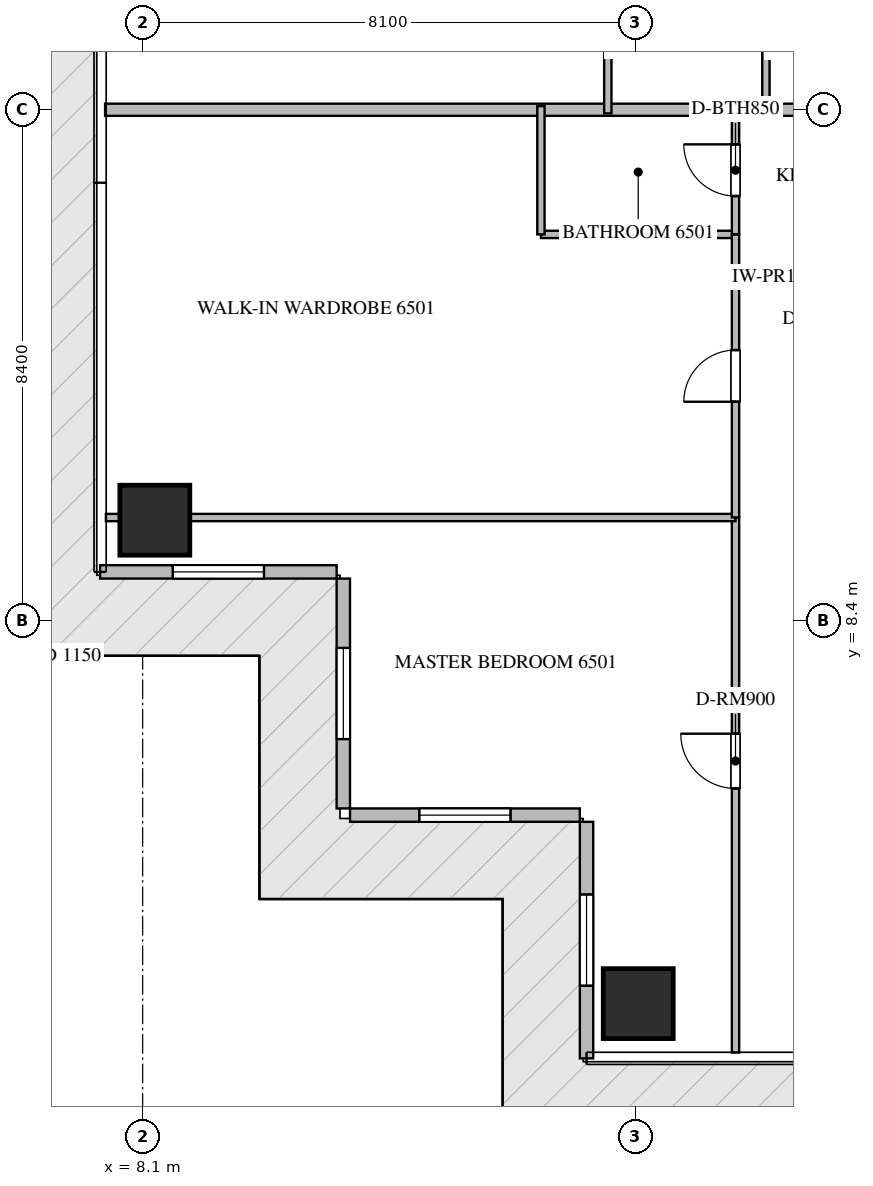
"""IFC4 building model, lengths in metres.
Left out: names, types, materials, properties, quantities, classifications, styles, units other than length and angle.
Written with IfcOpenShell. Run it as: python <this file> out.ifc"""

import sys

from ifc_helpers import new_model, si_unit, direction, frame, frame_2d, origin, origin_2d, place, context, subcontext, project, spatial, rectangle, extrude, source, transform, mapped, element, fill, save


model = new_model("IFC4")
c1 = context("Model", 3, precision=1e-05, world=origin(), true_north=direction((0.0, 1.0)))
c2 = subcontext(c1, "Body", "Model", "MODEL_VIEW")
j1 = project(units=[si_unit("LENGTHUNIT", "METRE"), si_unit("PLANEANGLEUNIT", "RADIAN")], contexts=[c1])
p1 = place(None, origin())
s1 = spatial("IfcSite", under=j1, at=p1, CompositionType="ELEMENT")
p2 = place(p1, origin())
s2 = spatial("IfcBuilding", under=s1, at=p2, CompositionType="ELEMENT")
p3 = place(p2, frame((0.0, 0.0, 260.5)))
s3 = spatial("IfcBuildingStorey", under=s2, at=p3, CompositionType="ELEMENT", Elevation=260.5)
m1 = source(origin(), c2, "Body", "SweptSolid", [
    extrude(rectangle(XDim=1.15, YDim=1.15, at=origin_2d()), origin(), (0.0, 0.0, 1.0), 3.85),
])
for number, where, z_axis, x_axis in (
    (1, (16.25, 2.1, -0.26), (0.0, 0.0, 1.0), (1.0, 0.0, 0.0)),
    (2, (8.3, 10.05, -0.26), (0.0, 0.0, 1.0), (1.0, 0.0, 0.0)),
):
    element("IfcColumn", number, at=place(p3, frame(where, z_axis=z_axis, x_axis=x_axis)), inside=s3, PredefinedType="COLUMN", context=c2, shape_type="MappedRepresentation", body=[
        mapped(m1, transform((0.0, 0.0, 0.0), scale=1.0)),
    ])
p4 = place(p3, frame((7.4, 9.2, 0.0), z_axis=(0.0, 0.0, 1.0), x_axis=(1.0, 0.0, 0.0)))
e3 = element("IfcWall", 3, at=p4, inside=s3, PredefinedType="ELEMENTEDWALL", context=c2, shape_type="SweptSolid", body=[
    extrude(rectangle(XDim=3.89, YDim=0.22, at=frame_2d((1.945, 0.0))), origin(), (0.0, 0.0, 1.0), 3.575),
])
p5 = place(p4, frame((1.195, 0.0, 0.65)))
e4 = element("IfcOpeningElement", 4, at=p5, cuts=e3, PredefinedType="OPENING", context=c2, shape_type="SweptSolid", body=[
    extrude(rectangle(XDim=1.5, YDim=2.25, at=frame_2d((0.75, 1.125))), frame((0.0, 0.12, 0.0), z_axis=(0.0, -1.0, 0.0), x_axis=(1.0, 0.0, 0.0)), (0.0, 0.0, 1.0), 0.24),
])
p6 = place(p3, frame((11.4, 9.09, 0.0), z_axis=(0.0, 0.0, 1.0), x_axis=(0.0, -1.0, 0.0)))
e5 = element("IfcWall", 5, at=p6, inside=s3, PredefinedType="ELEMENTEDWALL", context=c2, shape_type="SweptSolid", body=[
    extrude(rectangle(XDim=3.78, YDim=0.22, at=frame_2d((1.89, 0.0))), origin(), (0.0, 0.0, 1.0), 3.575),
])
p7 = place(p6, frame((1.14, 0.0, 0.65)))
e6 = element("IfcOpeningElement", 6, at=p7, cuts=e5, PredefinedType="OPENING", context=c2, shape_type="SweptSolid", body=[
    extrude(rectangle(XDim=1.5, YDim=2.25, at=frame_2d((0.75, 1.125))), frame((0.0, 0.12, 0.0), z_axis=(0.0, -1.0, 0.0), x_axis=(1.0, 0.0, 0.0)), (0.0, 0.0, 1.0), 0.24),
])
p8 = place(p3, frame((11.51, 5.2, 0.0), z_axis=(0.0, 0.0, 1.0), x_axis=(1.0, 0.0, 0.0)))
e7 = element("IfcWall", 7, at=p8, inside=s3, PredefinedType="ELEMENTEDWALL", context=c2, shape_type="SweptSolid", body=[
    extrude(rectangle(XDim=3.78, YDim=0.22, at=frame_2d((1.89, 0.0))), origin(), (0.0, 0.0, 1.0), 3.575),
])
p9 = place(p8, frame((1.14, 0.0, 0.65)))
e8 = element("IfcOpeningElement", 8, at=p9, cuts=e7, PredefinedType="OPENING", context=c2, shape_type="SweptSolid", body=[
    extrude(rectangle(XDim=1.5, YDim=2.25, at=frame_2d((0.75, 1.125))), frame((0.0, 0.12, 0.0), z_axis=(0.0, -1.0, 0.0), x_axis=(1.0, 0.0, 0.0)), (0.0, 0.0, 1.0), 0.24),
])
p10 = place(p3, frame((15.4, 5.09, 0.0), z_axis=(0.0, 0.0, 1.0), x_axis=(0.0, -1.0, 0.0)))
e9 = element("IfcWall", 9, at=p10, inside=s3, PredefinedType="ELEMENTEDWALL", context=c2, shape_type="SweptSolid", body=[
    extrude(rectangle(XDim=3.89, YDim=0.22, at=frame_2d((1.945, 0.0))), origin(), (0.0, 0.0, 1.0), 3.575),
])
p11 = place(p10, frame((1.195, 0.0, 0.65)))
e10 = element("IfcOpeningElement", 10, at=p11, cuts=e9, PredefinedType="OPENING", context=c2, shape_type="SweptSolid", body=[
    extrude(rectangle(XDim=1.5, YDim=2.25, at=frame_2d((0.75, 1.125))), frame((0.0, 0.12, 0.0), z_axis=(0.0, -1.0, 0.0), x_axis=(1.0, 0.0, 0.0)), (0.0, 0.0, 1.0), 0.24),
])
p12 = place(p3, frame((7.482, 16.8, 0.0), z_axis=(0.0, 0.0, 1.0), x_axis=(1.0, 0.0, 0.0)))
e11 = element("IfcWall", 11, at=p12, inside=s3, PredefinedType="PARTITIONING", context=c2, shape_type="SweptSolid", body=[
    extrude(rectangle(XDim=13.418, YDim=0.2, at=frame_2d((6.709, 0.0))), origin(), (0.0, 0.0, 1.0), 3.59),
])
p13 = place(p3, frame((17.85, 14.05, 0.0), z_axis=(0.0, 0.0, 1.0), x_axis=(1.0, 0.0, 0.0)))
e12 = element("IfcWall", 12, at=p13, inside=s3, PredefinedType="PARTITIONING", context=c2, shape_type="SweptSolid", body=[
    extrude(rectangle(XDim=2.85, YDim=0.12, at=frame_2d((1.425, 0.0))), origin(), (0.0, 0.0, 1.0), 3.59),
])
p14 = place(p13, frame((1.0, 0.0, 0.0)))
e13 = element("IfcOpeningElement", 13, at=p14, cuts=e12, PredefinedType="OPENING", context=c2, shape_type="SweptSolid", body=[
    extrude(rectangle(XDim=0.85, YDim=2.1, at=frame_2d((0.425, 1.05))), frame((0.0, 0.07, 0.0), z_axis=(0.0, -1.0, 0.0), x_axis=(1.0, 0.0, 0.0)), (0.0, 0.0, 1.0), 0.14),
])
p15 = place(p3, frame((17.85, 1.295, 0.0), z_axis=(0.0, 0.0, 1.0), x_axis=(0.0, 1.0, 0.0)))
e14 = element("IfcWall", 14, at=p15, inside=s3, PredefinedType="PARTITIONING", context=c2, shape_type="SweptSolid", body=[
    extrude(rectangle(XDim=8.799, YDim=0.12, at=frame_2d((4.399, 0.0))), origin(), (0.0, 0.0, 1.0), 3.59),
])
p16 = place(p15, frame((4.344, 0.0, 0.0)))
e15 = element("IfcOpeningElement", 15, at=p16, cuts=e14, PredefinedType="OPENING", context=c2, shape_type="SweptSolid", body=[
    extrude(rectangle(XDim=0.9, YDim=2.1, at=frame_2d((0.45, 1.05))), frame((0.0, 0.07, 0.0), z_axis=(0.0, -1.0, 0.0), x_axis=(1.0, 0.0, 0.0)), (0.0, 0.0, 1.0), 0.14),
])
p17 = place(p3, frame((7.495, 10.094, 0.0), z_axis=(0.0, 0.0, 1.0), x_axis=(1.0, 0.0, 0.0)))
e16 = element("IfcWall", 16, at=p17, inside=s3, PredefinedType="PARTITIONING", context=c2, shape_type="SweptSolid", body=[
    extrude(rectangle(XDim=10.355, YDim=0.12, at=frame_2d((5.177, 0.0))), origin(), (0.0, 0.0, 1.0), 3.122),
])
p18 = place(p3, frame((14.65, 14.75, 0.0), z_axis=(0.0, 0.0, 1.0), x_axis=(1.0, 0.0, 0.0)))
e17 = element("IfcWall", 17, at=p18, inside=s3, PredefinedType="PARTITIONING", context=c2, shape_type="SweptSolid", body=[
    extrude(rectangle(XDim=3.2, YDim=0.12, at=frame_2d((1.6, 0.0))), origin(), (0.0, 0.0, 1.0), 3.59),
])
p19 = place(p3, frame((14.65, 14.75, 0.0), z_axis=(0.0, 0.0, 1.0), x_axis=(0.0, 1.0, 0.0)))
e18 = element("IfcWall", 18, at=p19, inside=s3, PredefinedType="PARTITIONING", context=c2, shape_type="SweptSolid", body=[
    extrude(rectangle(XDim=2.11, YDim=0.12, at=frame_2d((1.055, 0.0))), origin(), (0.0, 0.0, 1.0), 3.59),
])
p20 = place(p3, frame((17.85, 10.096, 0.0), z_axis=(0.0, 0.0, 1.0), x_axis=(0.0, 1.0, 0.0)))
e19 = element("IfcWall", 19, at=p20, inside=s3, PredefinedType="PARTITIONING", context=c2, shape_type="SweptSolid", body=[
    extrude(rectangle(XDim=4.654, YDim=0.12, at=frame_2d((2.327, 0.0))), origin(), (0.0, 0.0, 1.0), 3.59),
])
p21 = place(p20, frame((1.902, 0.0, 0.0)))
e20 = element("IfcOpeningElement", 20, at=p21, cuts=e19, PredefinedType="OPENING", context=c2, shape_type="SweptSolid", body=[
    extrude(rectangle(XDim=0.85, YDim=2.1, at=frame_2d((0.425, 1.05))), frame((0.0, 0.07, 0.0), z_axis=(0.0, -1.0, 0.0), x_axis=(1.0, 0.0, 0.0)), (0.0, 0.0, 1.0), 0.14),
])
p22 = place(p3, frame((17.85, 14.752, 0.0), z_axis=(0.0, 0.0, 1.0), x_axis=(0.0, 1.0, 0.0)))
e21 = element("IfcWall", 21, at=p22, inside=s3, PredefinedType="PARTITIONING", context=c2, shape_type="SweptSolid", body=[
    extrude(rectangle(XDim=2.108, YDim=0.12, at=frame_2d((1.054, 0.0))), origin(), (0.0, 0.0, 1.0), 3.59),
])
p23 = place(p22, frame((0.629, 0.0, 0.0)))
e22 = element("IfcOpeningElement", 22, at=p23, cuts=e21, PredefinedType="OPENING", context=c2, shape_type="SweptSolid", body=[
    extrude(rectangle(XDim=0.85, YDim=2.1, at=frame_2d((0.425, 1.05))), frame((0.0, 0.07, 0.0), z_axis=(0.0, -1.0, 0.0), x_axis=(1.0, 0.0, 0.0)), (0.0, 0.0, 1.0), 0.14),
])
for number, where, z_axis, x_axis in (
    (23, (18.35, 16.74, 0.0), (0.0, 0.0, 1.0), (0.0, 1.0, 0.0)),
    (24, (15.75, 16.74, 0.0), (0.0, 0.0, 1.0), (0.0, 1.0, 0.0)),
):
    element("IfcWall", number, at=place(p3, frame(where, z_axis=z_axis, x_axis=x_axis)), inside=s3, PredefinedType="PARTITIONING", context=c2, shape_type="SweptSolid", body=[
        extrude(rectangle(XDim=2.66, YDim=0.12, at=frame_2d((1.33, 0.0))), origin(), (0.0, 0.0, 1.0), 3.59),
    ])
m2 = source(origin(), c2, "Body", "SweptSolid", [
    extrude(rectangle(XDim=1.5, YDim=2.25, at=frame_2d((0.75, 1.125))), frame((0.0, 0.03, 0.0), z_axis=(0.0, -1.0, 0.0), x_axis=(1.0, 0.0, 0.0)), (0.0, 0.0, 1.0), 0.06),
])
p24 = place(p5, origin())
e25 = element("IfcWindow", 25, at=p24, inside=s3, PartitioningType="SINGLE_PANEL", PredefinedType="WINDOW", context=c2, shape_type="MappedRepresentation", body=[
    mapped(m2, transform((0.0, 0.0, 0.0), scale=1.0)),
])
fill(e4, e25)
p25 = place(p7, origin())
e26 = element("IfcWindow", 26, at=p25, inside=s3, PartitioningType="SINGLE_PANEL", PredefinedType="WINDOW", context=c2, shape_type="MappedRepresentation", body=[
    mapped(m2, transform((0.0, 0.0, 0.0), scale=1.0)),
])
fill(e6, e26)
p26 = place(p9, origin())
e27 = element("IfcWindow", 27, at=p26, inside=s3, PartitioningType="SINGLE_PANEL", PredefinedType="WINDOW", context=c2, shape_type="MappedRepresentation", body=[
    mapped(m2, transform((0.0, 0.0, 0.0), scale=1.0)),
])
fill(e8, e27)
p27 = place(p11, origin())
e28 = element("IfcWindow", 28, at=p27, inside=s3, PartitioningType="SINGLE_PANEL", PredefinedType="WINDOW", context=c2, shape_type="MappedRepresentation", body=[
    mapped(m2, transform((0.0, 0.0, 0.0), scale=1.0)),
])
fill(e10, e28)
m3 = source(origin(), c2, "Body", "SweptSolid", [
    extrude(rectangle(XDim=0.9, YDim=2.1, at=frame_2d((0.45, 1.05))), frame((0.0, 0.025, 0.0), z_axis=(0.0, -1.0, 0.0), x_axis=(1.0, 0.0, 0.0)), (0.0, 0.0, 1.0), 0.05),
])
p28 = place(p16, origin())
e29 = element("IfcDoor", 29, at=p28, inside=s3, OperationType="SINGLE_SWING_RIGHT", PredefinedType="DOOR", context=c2, shape_type="MappedRepresentation", body=[
    mapped(m3, transform((0.0, 0.0, 0.0), scale=1.0)),
])
fill(e15, e29)
m4 = source(origin(), c2, "Body", "SweptSolid", [
    extrude(rectangle(XDim=0.85, YDim=2.1, at=frame_2d((0.425, 1.05))), frame((0.0, 0.025, 0.0), z_axis=(0.0, -1.0, 0.0), x_axis=(1.0, 0.0, 0.0)), (0.0, 0.0, 1.0), 0.05),
])
p29 = place(p21, origin())
e30 = element("IfcDoor", 30, at=p29, inside=s3, OperationType="SINGLE_SWING_LEFT", PredefinedType="DOOR", context=c2, shape_type="MappedRepresentation", body=[
    mapped(m4, transform((0.0, 0.0, 0.0), scale=1.0)),
])
fill(e20, e30)
p30 = place(p23, origin())
e31 = element("IfcDoor", 31, at=p30, inside=s3, OperationType="SINGLE_SWING_RIGHT", PredefinedType="DOOR", context=c2, shape_type="MappedRepresentation", body=[
    mapped(m4, transform((0.0, 0.0, 0.0), scale=1.0)),
])
fill(e22, e31)
save(model, sys.argv[1])
